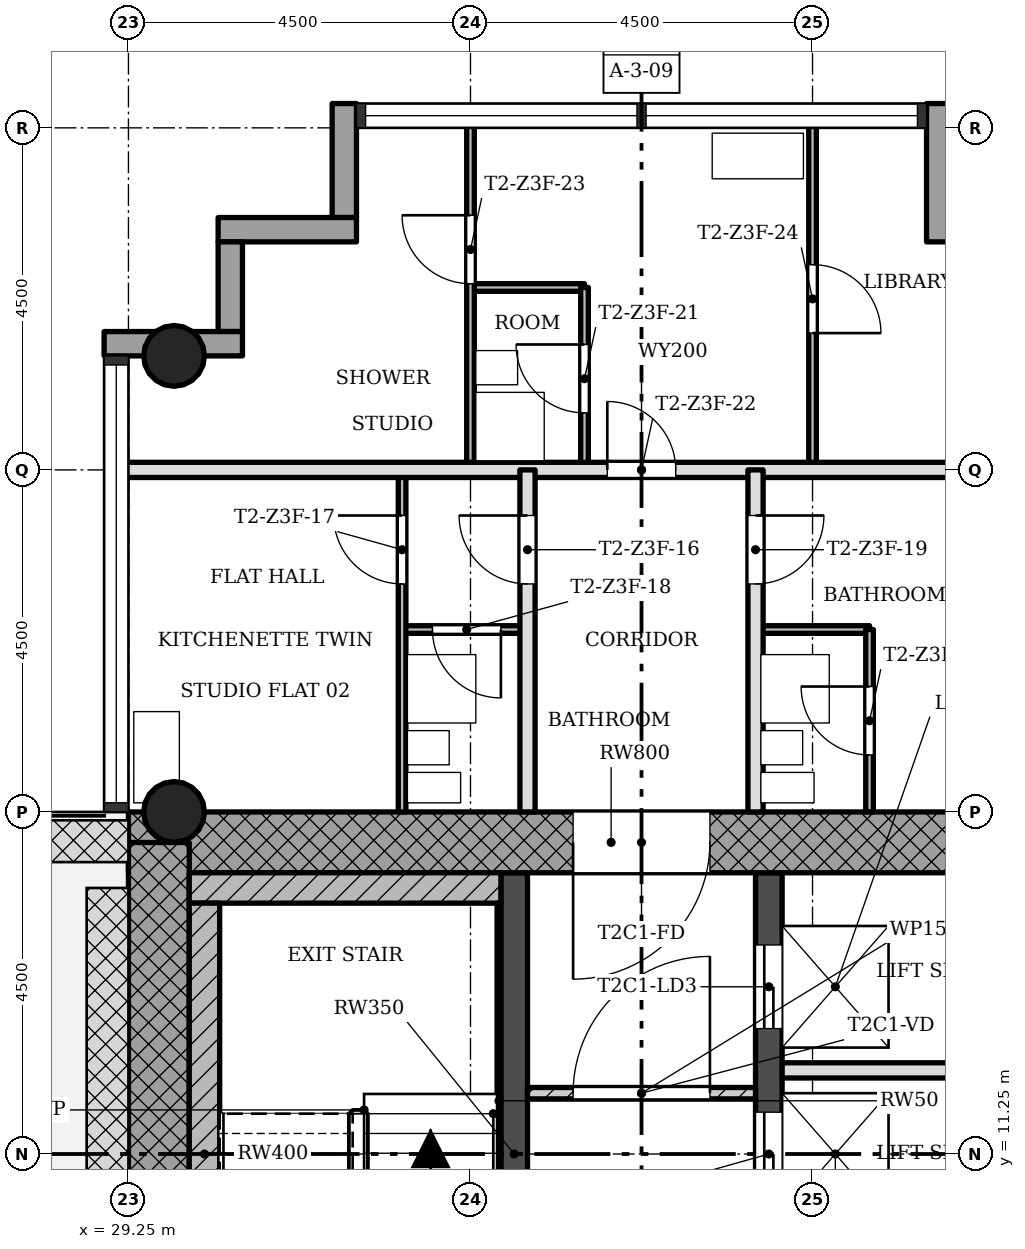
"""IFC4 building model, lengths in metres.
Left out: names, types, materials, properties, quantities, classifications, styles, units other than length and angle.
Written with IfcOpenShell. Run it as: python <this file> out.ifc"""

import sys

from ifc_helpers import new_model, si_unit, direction, frame, frame_2d, origin, origin_2d, place, context, subcontext, project, spatial, rectangle, hollow_circle, extrude, element, fill, save


model = new_model("IFC4")
c1 = context("Model", 3, precision=1e-05, world=origin(), true_north=direction((0.0, 1.0)))
c2 = subcontext(c1, "Body", "Model", "MODEL_VIEW")
j1 = project(units=[si_unit("LENGTHUNIT", "METRE"), si_unit("PLANEANGLEUNIT", "RADIAN")], contexts=[c1])
p1 = place(None, origin())
s1 = spatial("IfcSite", under=j1, at=p1, CompositionType="ELEMENT")
p2 = place(p1, origin())
s2 = spatial("IfcBuilding", under=s1, at=p2, CompositionType="ELEMENT")
p3 = place(p2, frame((0.0, 0.0, 167.7)))
s3 = spatial("IfcBuildingStorey", under=s2, at=p3, CompositionType="ELEMENT", Elevation=167.7)
p4 = place(p3, frame((41.95, 15.35, 0.0), z_axis=(0.0, 0.0, 1.0), x_axis=(-1.0, 0.0, 0.0)))
e1 = element("IfcWall", 1, at=p4, inside=s3, PredefinedType="SHEAR", context=c2, shape_type="SweptSolid", body=[
    extrude(rectangle(XDim=12.7, YDim=0.8, at=frame_2d((6.35, 0.0))), origin(), (0.0, 0.0, 1.0), 3.4),
])
p5 = place(p4, frame((5.05, 0.0, 0.0)))
e2 = element("IfcOpeningElement", 2, at=p5, cuts=e1, PredefinedType="OPENING", context=c2, shape_type="SweptSolid", body=[
    extrude(rectangle(XDim=1.8, YDim=2.1, at=frame_2d((0.9, 1.05))), frame((0.0, 0.41, 0.0), z_axis=(0.0, -1.0, 0.0), x_axis=(1.0, 0.0, 0.0)), (0.0, 0.0, 1.0), 0.82),
])
p6 = place(p3, frame((29.65, 15.348, 0.0), z_axis=(0.0, 0.0, 1.0), x_axis=(0.0, -1.0, 0.0)))
e3 = element("IfcWall", 3, at=p6, inside=s3, PredefinedType="SHEAR", context=c2, shape_type="SweptSolid", body=[
    extrude(rectangle(XDim=8.796, YDim=0.8, at=frame_2d((4.398, 0.0))), origin(), (0.0, 0.0, 1.0), 3.4),
])
p7 = place(p3, frame((34.325, 7.55, 0.0), z_axis=(0.0, 0.0, 1.0), x_axis=(0.0, 1.0, 0.0)))
e4 = element("IfcWall", 4, at=p7, inside=s3, PredefinedType="SHEAR", context=c2, shape_type="SweptSolid", body=[
    extrude(rectangle(XDim=7.4, YDim=0.35, at=frame_2d((3.7, 0.0))), origin(), (0.0, 0.0, 1.0), 3.4),
])
p8 = place(p7, frame((0.85, 0.0, 0.0)))
e5 = element("IfcOpeningElement", 5, at=p8, cuts=e4, PredefinedType="OPENING", context=c2, shape_type="SweptSolid", body=[
    extrude(rectangle(XDim=0.9, YDim=2.1, at=frame_2d((0.45, 1.05))), frame((0.0, 0.185, 0.0), z_axis=(0.0, -1.0, 0.0), x_axis=(1.0, 0.0, 0.0)), (0.0, 0.0, 1.0), 0.37),
])
p9 = place(p3, frame((37.675, 7.55, 0.0), z_axis=(0.0, 0.0, 1.0), x_axis=(0.0, 1.0, 0.0)))
e6 = element("IfcWall", 6, at=p9, inside=s3, PredefinedType="SHEAR", context=c2, shape_type="SweptSolid", body=[
    extrude(rectangle(XDim=7.4, YDim=0.35, at=frame_2d((3.7, 0.0))), origin(), (0.0, 0.0, 1.0), 3.4),
])
p10 = place(p9, frame((0.95, 0.0, 0.0)))
e7 = element("IfcOpeningElement", 7, at=p10, cuts=e6, PredefinedType="OPENING", context=c2, shape_type="SweptSolid", body=[
    extrude(rectangle(XDim=1.1, YDim=2.1, at=frame_2d((0.55, 1.05))), frame((0.0, 0.185, 0.0), z_axis=(0.0, -1.0, 0.0), x_axis=(1.0, 0.0, 0.0)), (0.0, 0.0, 1.0), 0.37),
])
p11 = place(p9, frame((3.15, 0.0, 0.0)))
e8 = element("IfcOpeningElement", 8, at=p11, cuts=e6, PredefinedType="OPENING", context=c2, shape_type="SweptSolid", body=[
    extrude(rectangle(XDim=1.1, YDim=2.1, at=frame_2d((0.55, 1.05))), frame((0.0, 0.185, 0.0), z_axis=(0.0, -1.0, 0.0), x_axis=(1.0, 0.0, 0.0)), (0.0, 0.0, 1.0), 0.37),
])
p12 = place(p9, frame((5.35, 0.0, 0.0)))
e9 = element("IfcOpeningElement", 9, at=p12, cuts=e6, PredefinedType="OPENING", context=c2, shape_type="SweptSolid", body=[
    extrude(rectangle(XDim=1.1, YDim=2.1, at=frame_2d((0.55, 1.05))), frame((0.0, 0.185, 0.0), z_axis=(0.0, -1.0, 0.0), x_axis=(1.0, 0.0, 0.0)), (0.0, 0.0, 1.0), 0.37),
])
for number, where, z_axis, x_axis in (
    (10, (29.85, 15.75, 0.0), (0.0, 0.0, 1.0), (1.0, 0.0, 0.0)),
    (11, (29.85, 21.75, 0.0), (0.0, 0.0, 1.0), (1.0, 0.0, 0.0)),
):
    element("IfcColumn", number, at=place(p3, frame(where, z_axis=z_axis, x_axis=x_axis)), inside=s3, PredefinedType="COLUMN", context=c2, shape_type="SweptSolid", body=[
        extrude(hollow_circle(Radius=0.4, WallThickness=0.028, at=origin_2d()), origin(), (0.0, 0.0, 1.0), 3.4),
    ])
p13 = place(p3, frame((39.91, 23.25, -0.3), z_axis=(0.0, 0.0, 1.0), x_axis=(0.0, 1.0, 0.0)))
e12 = element("IfcWall", 12, at=p13, inside=s3, PredefinedType="STANDARD", context=c2, shape_type="SweptSolid", body=[
    extrude(rectangle(XDim=1.82, YDim=0.32, at=frame_2d((0.91, 0.0))), origin(), (0.0, 0.0, 1.0), 3.4),
])
p14 = place(p3, frame((32.09, 25.07, -0.3), z_axis=(0.0, 0.0, 1.0), x_axis=(0.0, -1.0, 0.0)))
e13 = element("IfcWall", 13, at=p14, inside=s3, PredefinedType="STANDARD", context=c2, shape_type="SweptSolid", body=[
    extrude(rectangle(XDim=1.5, YDim=0.32, at=frame_2d((0.75, 0.0))), origin(), (0.0, 0.0, 1.0), 3.4),
])
p15 = place(p3, frame((32.25, 23.41, -0.3), z_axis=(0.0, 0.0, 1.0), x_axis=(-1.0, 0.0, 0.0)))
e14 = element("IfcWall", 14, at=p15, inside=s3, PredefinedType="STANDARD", context=c2, shape_type="SweptSolid", body=[
    extrude(rectangle(XDim=1.82, YDim=0.32, at=frame_2d((0.91, 0.0))), origin(), (0.0, 0.0, 1.0), 3.4),
])
p16 = place(p3, frame((30.59, 23.25, -0.3), z_axis=(0.0, 0.0, 1.0), x_axis=(0.0, -1.0, 0.0)))
e15 = element("IfcWall", 15, at=p16, inside=s3, PredefinedType="STANDARD", context=c2, shape_type="SweptSolid", body=[
    extrude(rectangle(XDim=1.18, YDim=0.32, at=frame_2d((0.59, 0.0))), origin(), (0.0, 0.0, 1.0), 3.4),
])
p17 = place(p3, frame((30.75, 21.91, -0.3), z_axis=(0.0, 0.0, 1.0), x_axis=(-1.0, 0.0, 0.0)))
e16 = element("IfcWall", 16, at=p17, inside=s3, PredefinedType="STANDARD", context=c2, shape_type="SweptSolid", body=[
    extrude(rectangle(XDim=1.82, YDim=0.32, at=frame_2d((0.91, 0.0))), origin(), (0.0, 0.0, 1.0), 3.4),
])
p18 = place(p3, frame((37.5, 12.05, 0.0), z_axis=(0.0, 0.0, 1.0), x_axis=(-1.0, 0.0, 0.0)))
e17 = element("IfcWall", 17, at=p18, inside=s3, PredefinedType="PARTITIONING", context=c2, shape_type="SweptSolid", body=[
    extrude(rectangle(XDim=3.0, YDim=0.15, at=frame_2d((1.5, 0.0))), origin(), (0.0, 0.0, 1.0), 3.0),
])
p19 = place(p18, frame((0.6, 0.0, 0.0)))
e18 = element("IfcOpeningElement", 18, at=p19, cuts=e17, PredefinedType="OPENING", context=c2, shape_type="SweptSolid", body=[
    extrude(rectangle(XDim=1.8, YDim=2.1, at=frame_2d((0.9, 1.05))), frame((0.0, 0.085, 0.0), z_axis=(0.0, -1.0, 0.0), x_axis=(1.0, 0.0, 0.0)), (0.0, 0.0, 1.0), 0.17),
])
p20 = place(p3, frame((41.95, 12.35, 0.0), z_axis=(0.0, 0.0, 1.0), x_axis=(-1.0, 0.0, 0.0)))
e19 = element("IfcWall", 19, at=p20, inside=s3, PredefinedType="SOLIDWALL", context=c2, shape_type="SweptSolid", body=[
    extrude(rectangle(XDim=4.1, YDim=0.2, at=frame_2d((2.05, 0.0))), origin(), (0.0, 0.0, 1.0), 3.0),
])
p21 = place(p3, frame((39.0, 18.15, 0.0), z_axis=(0.0, 0.0, 1.0), x_axis=(-1.0, 0.0, 0.0)))
e20 = element("IfcWall", 20, at=p21, inside=s3, PredefinedType="PARTITIONING", context=c2, shape_type="SweptSolid", body=[
    extrude(rectangle(XDim=1.5, YDim=0.1, at=frame_2d((0.75, 0.0))), origin(), (0.0, 0.0, 1.0), 3.0),
])
p22 = place(p3, frame((34.5, 18.15, 0.0), z_axis=(0.0, 0.0, 1.0), x_axis=(-1.0, 0.0, 0.0)))
e21 = element("IfcWall", 21, at=p22, inside=s3, PredefinedType="PARTITIONING", context=c2, shape_type="SweptSolid", body=[
    extrude(rectangle(XDim=1.65, YDim=0.1, at=frame_2d((0.825, 0.0))), origin(), (0.0, 0.0, 1.0), 3.0),
])
p23 = place(p22, frame((0.35, 0.0, 0.0)))
e22 = element("IfcOpeningElement", 22, at=p23, cuts=e21, PredefinedType="OPENING", context=c2, shape_type="SweptSolid", body=[
    extrude(rectangle(XDim=0.9, YDim=2.1, at=frame_2d((0.45, 1.05))), frame((0.0, 0.06, 0.0), z_axis=(0.0, -1.0, 0.0), x_axis=(1.0, 0.0, 0.0)), (0.0, 0.0, 1.0), 0.12),
])
p24 = place(p3, frame((42.85, 20.25, 0.0), z_axis=(0.0, 0.0, 1.0), x_axis=(-1.0, 0.0, 0.0)))
e23 = element("IfcWall", 23, at=p24, inside=s3, PredefinedType="SOLIDWALL", context=c2, shape_type="SweptSolid", body=[
    extrude(rectangle(XDim=13.7, YDim=0.2, at=frame_2d((6.85, 0.0))), origin(), (0.0, 0.0, 1.0), 3.0),
])
p25 = place(p24, frame((6.4, 0.0, 0.0)))
e24 = element("IfcOpeningElement", 24, at=p25, cuts=e23, PredefinedType="OPENING", context=c2, shape_type="SweptSolid", body=[
    extrude(rectangle(XDim=0.9, YDim=2.1, at=frame_2d((0.45, 1.05))), frame((0.0, 0.11, 0.0), z_axis=(0.0, -1.0, 0.0), x_axis=(1.0, 0.0, 0.0)), (0.0, 0.0, 1.0), 0.22),
])
p26 = place(p3, frame((35.25, 22.65, 0.0), z_axis=(0.0, 0.0, 1.0), x_axis=(-1.0, 0.0, 0.0)))
e25 = element("IfcWall", 25, at=p26, inside=s3, PredefinedType="PARTITIONING", context=c2, shape_type="SweptSolid", body=[
    extrude(rectangle(XDim=1.5, YDim=0.1, at=frame_2d((0.75, 0.0))), origin(), (0.0, 0.0, 1.0), 3.0),
])
p27 = place(p3, frame((39.0, 15.75, 0.0), z_axis=(0.0, 0.0, 1.0), x_axis=(0.0, 1.0, 0.0)))
e26 = element("IfcWall", 26, at=p27, inside=s3, PredefinedType="PARTITIONING", context=c2, shape_type="SweptSolid", body=[
    extrude(rectangle(XDim=2.4, YDim=0.1, at=frame_2d((1.2, 0.0))), origin(), (0.0, 0.0, 1.0), 3.0),
])
p28 = place(p27, frame((0.75, 0.0, 0.0)))
e27 = element("IfcOpeningElement", 27, at=p28, cuts=e26, PredefinedType="OPENING", context=c2, shape_type="SweptSolid", body=[
    extrude(rectangle(XDim=0.9, YDim=2.1, at=frame_2d((0.45, 1.05))), frame((0.0, 0.06, 0.0), z_axis=(0.0, -1.0, 0.0), x_axis=(1.0, 0.0, 0.0)), (0.0, 0.0, 1.0), 0.12),
])
p29 = place(p3, frame((38.25, 20.25, 0.0), z_axis=(0.0, 0.0, 1.0), x_axis=(0.0, 1.0, 0.0)))
e28 = element("IfcWall", 28, at=p29, inside=s3, PredefinedType="PARTITIONING", context=c2, shape_type="SweptSolid", body=[
    extrude(rectangle(XDim=4.6, YDim=0.1, at=frame_2d((2.3, 0.0))), origin(), (0.0, 0.0, 1.0), 3.0),
])
p30 = place(p29, frame((1.8, 0.0, 0.0)))
e29 = element("IfcOpeningElement", 29, at=p30, cuts=e28, PredefinedType="OPENING", context=c2, shape_type="SweptSolid", body=[
    extrude(rectangle(XDim=0.9, YDim=2.1, at=frame_2d((0.45, 1.05))), frame((0.0, 0.06, 0.0), z_axis=(0.0, -1.0, 0.0), x_axis=(1.0, 0.0, 0.0)), (0.0, 0.0, 1.0), 0.12),
])
p31 = place(p3, frame((37.5, 15.75, 0.0), z_axis=(0.0, 0.0, 1.0), x_axis=(0.0, 1.0, 0.0)))
e30 = element("IfcWall", 30, at=p31, inside=s3, PredefinedType="SOLIDWALL", context=c2, shape_type="SweptSolid", body=[
    extrude(rectangle(XDim=4.5, YDim=0.2, at=frame_2d((2.25, 0.0))), origin(), (0.0, 0.0, 1.0), 3.0),
])
p32 = place(p31, frame((3.0, 0.0, 0.0)))
e31 = element("IfcOpeningElement", 31, at=p32, cuts=e30, PredefinedType="OPENING", context=c2, shape_type="SweptSolid", body=[
    extrude(rectangle(XDim=0.9, YDim=2.1, at=frame_2d((0.45, 1.05))), frame((0.0, 0.11, 0.0), z_axis=(0.0, -1.0, 0.0), x_axis=(1.0, 0.0, 0.0)), (0.0, 0.0, 1.0), 0.22),
])
p33 = place(p3, frame((35.25, 20.25, 0.0), z_axis=(0.0, 0.0, 1.0), x_axis=(0.0, 1.0, 0.0)))
e32 = element("IfcWall", 32, at=p33, inside=s3, PredefinedType="PARTITIONING", context=c2, shape_type="SweptSolid", body=[
    extrude(rectangle(XDim=2.4, YDim=0.1, at=frame_2d((1.2, 0.0))), origin(), (0.0, 0.0, 1.0), 3.0),
])
p34 = place(p33, frame((0.75, 0.0, 0.0)))
e33 = element("IfcOpeningElement", 33, at=p34, cuts=e32, PredefinedType="OPENING", context=c2, shape_type="SweptSolid", body=[
    extrude(rectangle(XDim=0.9, YDim=2.1, at=frame_2d((0.45, 1.05))), frame((0.0, 0.06, 0.0), z_axis=(0.0, -1.0, 0.0), x_axis=(1.0, 0.0, 0.0)), (0.0, 0.0, 1.0), 0.12),
])
p35 = place(p3, frame((34.5, 15.75, 0.0), z_axis=(0.0, 0.0, 1.0), x_axis=(0.0, 1.0, 0.0)))
e34 = element("IfcWall", 34, at=p35, inside=s3, PredefinedType="SOLIDWALL", context=c2, shape_type="SweptSolid", body=[
    extrude(rectangle(XDim=4.5, YDim=0.2, at=frame_2d((2.25, 0.0))), origin(), (0.0, 0.0, 1.0), 3.0),
])
p36 = place(p35, frame((3.0, 0.0, 0.0)))
e35 = element("IfcOpeningElement", 35, at=p36, cuts=e34, PredefinedType="OPENING", context=c2, shape_type="SweptSolid", body=[
    extrude(rectangle(XDim=0.9, YDim=2.1, at=frame_2d((0.45, 1.05))), frame((0.0, 0.11, 0.0), z_axis=(0.0, -1.0, 0.0), x_axis=(1.0, 0.0, 0.0)), (0.0, 0.0, 1.0), 0.22),
])
p37 = place(p3, frame((33.75, 20.25, 0.0), z_axis=(0.0, 0.0, 1.0), x_axis=(0.0, 1.0, 0.0)))
e36 = element("IfcWall", 36, at=p37, inside=s3, PredefinedType="PARTITIONING", context=c2, shape_type="SweptSolid", body=[
    extrude(rectangle(XDim=4.6, YDim=0.1, at=frame_2d((2.3, 0.0))), origin(), (0.0, 0.0, 1.0), 3.0),
])
p38 = place(p37, frame((2.45, 0.0, 0.0)))
e37 = element("IfcOpeningElement", 37, at=p38, cuts=e36, PredefinedType="OPENING", context=c2, shape_type="SweptSolid", body=[
    extrude(rectangle(XDim=0.9, YDim=2.1, at=frame_2d((0.45, 1.05))), frame((0.0, 0.06, 0.0), z_axis=(0.0, -1.0, 0.0), x_axis=(1.0, 0.0, 0.0)), (0.0, 0.0, 1.0), 0.12),
])
p39 = place(p3, frame((32.85, 15.75, 0.0), z_axis=(0.0, 0.0, 1.0), x_axis=(0.0, 1.0, 0.0)))
e38 = element("IfcWall", 38, at=p39, inside=s3, PredefinedType="PARTITIONING", context=c2, shape_type="SweptSolid", body=[
    extrude(rectangle(XDim=4.5, YDim=0.1, at=frame_2d((2.25, 0.0))), origin(), (0.0, 0.0, 1.0), 3.0),
])
p40 = place(p39, frame((3.0, 0.0, 0.0)))
e39 = element("IfcOpeningElement", 39, at=p40, cuts=e38, PredefinedType="OPENING", context=c2, shape_type="SweptSolid", body=[
    extrude(rectangle(XDim=0.9, YDim=2.1, at=frame_2d((0.45, 1.05))), frame((0.0, 0.06, 0.0), z_axis=(0.0, -1.0, 0.0), x_axis=(1.0, 0.0, 0.0)), (0.0, 0.0, 1.0), 0.12),
])
p41 = place(p3, frame((34.15, 14.75, 0.0), z_axis=(0.0, 0.0, 1.0), x_axis=(-1.0, 0.0, 0.0)))
e40 = element("IfcWall", 40, at=p41, inside=s3, PredefinedType="SHEAR", context=c2, shape_type="SweptSolid", body=[
    extrude(rectangle(XDim=4.1, YDim=0.4, at=frame_2d((2.05, 0.0))), origin(), (0.0, 0.0, 1.0), 3.4),
])
p42 = place(p3, frame((30.25, 7.95, 0.0), z_axis=(0.0, 0.0, 1.0), x_axis=(0.0, 1.0, 0.0)))
e41 = element("IfcWall", 41, at=p42, inside=s3, PredefinedType="SHEAR", context=c2, shape_type="SweptSolid", body=[
    extrude(rectangle(XDim=6.6, YDim=0.4, at=frame_2d((3.3, 0.0))), origin(), (0.0, 0.0, 1.0), 3.4),
])
p43 = place(p3, frame((34.125, 9.35, 0.0), z_axis=(0.0, 0.0, 1.0), x_axis=(0.0, 1.0, 0.0)))
e42 = element("IfcWall", 42, at=p43, inside=s3, PredefinedType="SHEAR", context=c2, shape_type="SweptSolid", body=[
    extrude(rectangle(XDim=5.2, YDim=0.05, at=frame_2d((2.6, 0.0))), origin(), (0.0, 0.0, 1.0), 3.4),
])
p44 = place(p19, origin())
e43 = element("IfcDoor", 43, at=p44, inside=s3, OperationType="SINGLE_SWING_LEFT", PredefinedType="DOOR", context=c2, shape_type="SweptSolid", body=[
    extrude(rectangle(XDim=1.8, YDim=2.1, at=frame_2d((0.9, 1.05))), frame((0.0, 0.025, 0.0), z_axis=(0.0, -1.0, 0.0), x_axis=(1.0, 0.0, 0.0)), (0.0, 0.0, 1.0), 0.05),
])
fill(e18, e43)
p45 = place(p36, origin())
e44 = element("IfcDoor", 44, at=p45, inside=s3, OperationType="SINGLE_SWING_LEFT", PredefinedType="DOOR", context=c2, shape_type="SweptSolid", body=[
    extrude(rectangle(XDim=0.9, YDim=2.1, at=frame_2d((0.45, 1.05))), frame((0.0, 0.025, 0.0), z_axis=(0.0, -1.0, 0.0), x_axis=(1.0, 0.0, 0.0)), (0.0, 0.0, 1.0), 0.05),
])
fill(e35, e44)
p46 = place(p40, origin())
e45 = element("IfcDoor", 45, at=p46, inside=s3, OperationType="SINGLE_SWING_LEFT", PredefinedType="DOOR", context=c2, shape_type="SweptSolid", body=[
    extrude(rectangle(XDim=0.9, YDim=2.1, at=frame_2d((0.45, 1.05))), frame((0.0, 0.025, 0.0), z_axis=(0.0, -1.0, 0.0), x_axis=(1.0, 0.0, 0.0)), (0.0, 0.0, 1.0), 0.05),
])
fill(e39, e45)
p47 = place(p23, origin())
e46 = element("IfcDoor", 46, at=p47, inside=s3, OperationType="SINGLE_SWING_RIGHT", PredefinedType="DOOR", context=c2, shape_type="SweptSolid", body=[
    extrude(rectangle(XDim=0.9, YDim=2.1, at=frame_2d((0.45, 1.05))), frame((0.0, 0.025, 0.0), z_axis=(0.0, -1.0, 0.0), x_axis=(1.0, 0.0, 0.0)), (0.0, 0.0, 1.0), 0.05),
])
fill(e22, e46)
p48 = place(p32, origin())
e47 = element("IfcDoor", 47, at=p48, inside=s3, OperationType="SINGLE_SWING_RIGHT", PredefinedType="DOOR", context=c2, shape_type="SweptSolid", body=[
    extrude(rectangle(XDim=0.9, YDim=2.1, at=frame_2d((0.45, 1.05))), frame((0.0, 0.025, 0.0), z_axis=(0.0, -1.0, 0.0), x_axis=(1.0, 0.0, 0.0)), (0.0, 0.0, 1.0), 0.05),
])
fill(e31, e47)
p49 = place(p28, origin())
e48 = element("IfcDoor", 48, at=p49, inside=s3, OperationType="SINGLE_SWING_LEFT", PredefinedType="DOOR", context=c2, shape_type="SweptSolid", body=[
    extrude(rectangle(XDim=0.9, YDim=2.1, at=frame_2d((0.45, 1.05))), frame((0.0, 0.025, 0.0), z_axis=(0.0, -1.0, 0.0), x_axis=(1.0, 0.0, 0.0)), (0.0, 0.0, 1.0), 0.05),
])
fill(e27, e48)
p50 = place(p34, origin())
e49 = element("IfcDoor", 49, at=p50, inside=s3, OperationType="SINGLE_SWING_LEFT", PredefinedType="DOOR", context=c2, shape_type="SweptSolid", body=[
    extrude(rectangle(XDim=0.9, YDim=2.1, at=frame_2d((0.45, 1.05))), frame((0.0, 0.025, 0.0), z_axis=(0.0, -1.0, 0.0), x_axis=(1.0, 0.0, 0.0)), (0.0, 0.0, 1.0), 0.05),
])
fill(e33, e49)
p51 = place(p25, origin())
e50 = element("IfcDoor", 50, at=p51, inside=s3, OperationType="SINGLE_SWING_RIGHT", PredefinedType="DOOR", context=c2, shape_type="SweptSolid", body=[
    extrude(rectangle(XDim=0.9, YDim=2.1, at=frame_2d((0.45, 1.05))), frame((0.0, 0.025, 0.0), z_axis=(0.0, -1.0, 0.0), x_axis=(1.0, 0.0, 0.0)), (0.0, 0.0, 1.0), 0.05),
])
fill(e24, e50)
p52 = place(p38, origin())
e51 = element("IfcDoor", 51, at=p52, inside=s3, OperationType="SINGLE_SWING_LEFT", PredefinedType="DOOR", context=c2, shape_type="SweptSolid", body=[
    extrude(rectangle(XDim=0.9, YDim=2.1, at=frame_2d((0.45, 1.05))), frame((0.0, 0.025, 0.0), z_axis=(0.0, -1.0, 0.0), x_axis=(1.0, 0.0, 0.0)), (0.0, 0.0, 1.0), 0.05),
])
fill(e37, e51)
p53 = place(p30, origin())
e52 = element("IfcDoor", 52, at=p53, inside=s3, OperationType="SINGLE_SWING_LEFT", PredefinedType="DOOR", context=c2, shape_type="SweptSolid", body=[
    extrude(rectangle(XDim=0.9, YDim=2.1, at=frame_2d((0.45, 1.05))), frame((0.0, 0.025, 0.0), z_axis=(0.0, -1.0, 0.0), x_axis=(1.0, 0.0, 0.0)), (0.0, 0.0, 1.0), 0.05),
])
fill(e29, e52)
p54 = place(p11, origin())
e53 = element("IfcDoor", 53, at=p54, inside=s3, OperationType="SLIDING_TO_LEFT", PredefinedType="DOOR", context=c2, shape_type="SweptSolid", body=[
    extrude(rectangle(XDim=1.1, YDim=2.1, at=frame_2d((0.55, 1.05))), frame((0.0, 0.025, 0.0), z_axis=(0.0, -1.0, 0.0), x_axis=(1.0, 0.0, 0.0)), (0.0, 0.0, 1.0), 0.05),
])
fill(e8, e53)
p55 = place(p12, origin())
e54 = element("IfcDoor", 54, at=p55, inside=s3, OperationType="SLIDING_TO_LEFT", PredefinedType="DOOR", context=c2, shape_type="SweptSolid", body=[
    extrude(rectangle(XDim=1.1, YDim=2.1, at=frame_2d((0.55, 1.05))), frame((0.0, 0.025, 0.0), z_axis=(0.0, -1.0, 0.0), x_axis=(1.0, 0.0, 0.0)), (0.0, 0.0, 1.0), 0.05),
])
fill(e9, e54)
p56 = place(p5, origin())
e55 = element("IfcDoor", 55, at=p56, inside=s3, OperationType="SINGLE_SWING_LEFT", PredefinedType="DOOR", context=c2, shape_type="SweptSolid", body=[
    extrude(rectangle(XDim=1.8, YDim=2.1, at=frame_2d((0.9, 1.05))), frame((0.0, 0.025, 0.0), z_axis=(0.0, -1.0, 0.0), x_axis=(1.0, 0.0, 0.0)), (0.0, 0.0, 1.0), 0.05),
])
fill(e2, e55)
save(model, sys.argv[1])
